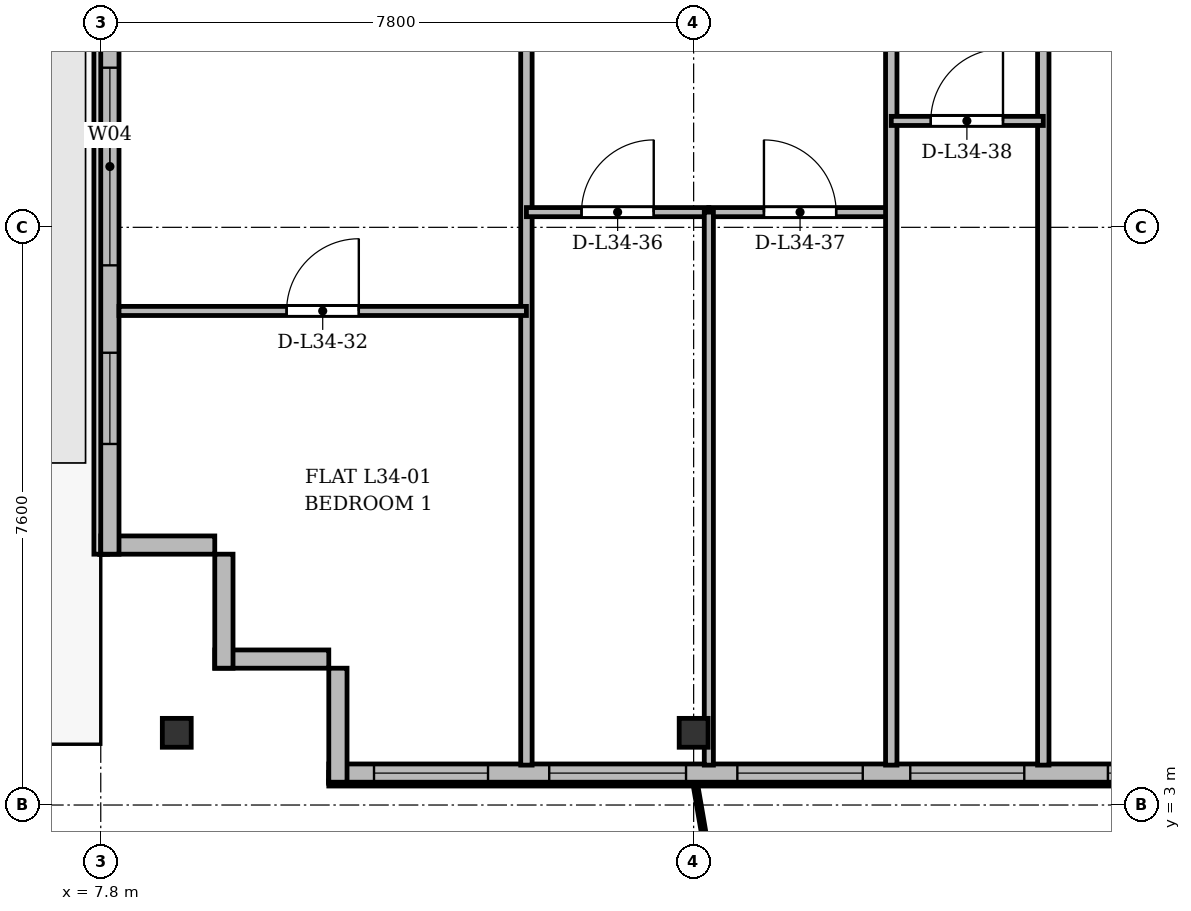
"""IFC4 building model, lengths in metres.
Left out: names, types, materials, properties, quantities, classifications, styles, units other than length and angle.
Written with IfcOpenShell. Run it as: python <this file> out.ifc"""

import sys

from ifc_helpers import new_model, si_unit, direction, frame, frame_2d, origin, origin_2d, place, context, subcontext, project, spatial, rectangle, i_section, extrude, source, transform, mapped, element, fill, save


model = new_model("IFC4")
c1 = context("Model", 3, precision=1e-05, world=origin(), true_north=direction((0.0, 1.0)))
c2 = subcontext(c1, "Body", "Model", "MODEL_VIEW")
j1 = project(units=[si_unit("LENGTHUNIT", "METRE"), si_unit("PLANEANGLEUNIT", "RADIAN")], contexts=[c1])
p1 = place(None, origin())
s1 = spatial("IfcSite", under=j1, at=p1, CompositionType="ELEMENT")
p2 = place(p1, origin())
s2 = spatial("IfcBuilding", under=s1, at=p2, CompositionType="ELEMENT")
p3 = place(p2, frame((0.0, 0.0, 132.1)))
s3 = spatial("IfcBuildingStorey", under=s2, at=p3, CompositionType="ELEMENT", Elevation=132.1)
m1 = source(origin(), c2, "Body", "SweptSolid", [
    extrude(i_section(OverallWidth=0.38, OverallDepth=0.38, WebThickness=0.02, FlangeThickness=0.03, at=origin_2d()), origin(), (0.0, 0.0, 1.0), 3.6),
])
for number, where, z_axis, x_axis in (
    (1, (8.8, 3.95, 0.0), (0.0, 0.0, 1.0), (1.0, 0.0, 0.0)),
    (2, (15.6, 3.95, 0.0), (0.0, 0.0, 1.0), (1.0, 0.0, 0.0)),
):
    element("IfcColumn", number, at=place(p3, frame(where, z_axis=z_axis, x_axis=x_axis)), inside=s3, PredefinedType="COLUMN", context=c2, shape_type="MappedRepresentation", body=[
        mapped(m1, transform((0.0, 0.0, 0.0), x_axis=(1.0, 0.0, 0.0), y_axis=(0.0, 1.0, 0.0), z_axis=(0.0, 0.0, 1.0), scale=1.0)),
    ])
for number, where, z_axis, x_axis in (
    (3, (10.8, 4.92, 0.0), (0.0, 0.0, 1.0), (-1.0, 0.0, 0.0)),
    (4, (9.42, 4.8, 0.0), (0.0, 0.0, 1.0), (0.0, 1.0, 0.0)),
):
    element("IfcWall", number, at=place(p3, frame(where, z_axis=z_axis, x_axis=x_axis)), inside=s3, PredefinedType="SOLIDWALL", context=c2, shape_type="SweptSolid", body=[
        extrude(rectangle(XDim=1.5, YDim=0.24, at=frame_2d((0.75, 0.0))), origin(), (0.0, 0.0, 1.0), 3.35),
    ])
p4 = place(p3, frame((9.3, 6.42, 0.0), z_axis=(0.0, 0.0, 1.0), x_axis=(-1.0, 0.0, 0.0)))
e5 = element("IfcWall", 5, at=p4, inside=s3, PredefinedType="SOLIDWALL", context=c2, shape_type="SweptSolid", body=[
    extrude(rectangle(XDim=1.5, YDim=0.24, at=frame_2d((0.75, 0.0))), origin(), (0.0, 0.0, 1.0), 2.85),
])
p5 = place(p3, frame((7.92, 6.3, 0.0), z_axis=(0.0, 0.0, 1.0), x_axis=(0.0, 1.0, 0.0)))
e6 = element("IfcWall", 6, at=p5, inside=s3, PredefinedType="SOLIDWALL", context=c2, shape_type="SweptSolid", body=[
    extrude(rectangle(XDim=39.2, YDim=0.24, at=frame_2d((19.6, 0.0))), origin(), (0.0, 0.0, 1.0), 3.35),
])
p6 = place(p5, frame((9.6, 0.0, 0.0)))
e7 = element("IfcOpeningElement", 7, at=p6, cuts=e6, PredefinedType="OPENING", context=c2, shape_type="SweptSolid", body=[
    extrude(rectangle(XDim=1.2, YDim=2.2, at=frame_2d((0.6, 1.1))), frame((0.0, 0.13, 0.0), z_axis=(0.0, -1.0, 0.0), x_axis=(1.0, 0.0, 0.0)), (0.0, 0.0, 1.0), 0.26),
])
p7 = place(p5, frame((1.45, 0.0, 0.92)))
e8 = element("IfcOpeningElement", 8, at=p7, cuts=e6, PredefinedType="OPENING", context=c2, shape_type="SweptSolid", body=[
    extrude(rectangle(XDim=1.2, YDim=1.65, at=frame_2d((0.6, 0.825))), frame((0.0, 0.13, 0.0), z_axis=(0.0, -1.0, 0.0), x_axis=(1.0, 0.0, 0.0)), (0.0, 0.0, 1.0), 0.26),
])
p8 = place(p5, frame((3.8, 0.0, 0.92)))
e9 = element("IfcOpeningElement", 9, at=p8, cuts=e6, PredefinedType="OPENING", context=c2, shape_type="SweptSolid", body=[
    extrude(rectangle(XDim=2.6, YDim=1.9, at=frame_2d((1.3, 0.95))), frame((0.0, 0.13, 0.0), z_axis=(0.0, -1.0, 0.0), x_axis=(1.0, 0.0, 0.0)), (0.0, 0.0, 1.0), 0.26),
])
p9 = place(p5, frame((15.2, 0.0, 0.92)))
e10 = element("IfcOpeningElement", 10, at=p9, cuts=e6, PredefinedType="OPENING", context=c2, shape_type="SweptSolid", body=[
    extrude(rectangle(XDim=2.6, YDim=1.9, at=frame_2d((1.3, 0.95))), frame((0.0, 0.13, 0.0), z_axis=(0.0, -1.0, 0.0), x_axis=(1.0, 0.0, 0.0)), (0.0, 0.0, 1.0), 0.26),
])
p10 = place(p5, frame((33.5, 0.0, 0.92)))
e11 = element("IfcOpeningElement", 11, at=p10, cuts=e6, PredefinedType="OPENING", context=c2, shape_type="SweptSolid", body=[
    extrude(rectangle(XDim=1.2, YDim=1.65, at=frame_2d((0.6, 0.825))), frame((0.0, 0.13, 0.0), z_axis=(0.0, -1.0, 0.0), x_axis=(1.0, 0.0, 0.0)), (0.0, 0.0, 1.0), 0.26),
])
p11 = place(p5, frame((36.85, 0.0, 0.92)))
e12 = element("IfcOpeningElement", 12, at=p11, cuts=e6, PredefinedType="OPENING", context=c2, shape_type="SweptSolid", body=[
    extrude(rectangle(XDim=1.2, YDim=1.65, at=frame_2d((0.6, 0.825))), frame((0.0, 0.13, 0.0), z_axis=(0.0, -1.0, 0.0), x_axis=(1.0, 0.0, 0.0)), (0.0, 0.0, 1.0), 0.26),
])
p12 = place(p3, frame((63.6, 3.42, 0.0), z_axis=(0.0, 0.0, 1.0), x_axis=(-1.0, 0.0, 0.0)))
e13 = element("IfcWall", 13, at=p12, inside=s3, PredefinedType="SOLIDWALL", context=c2, shape_type="SweptSolid", body=[
    extrude(rectangle(XDim=52.8, YDim=0.24, at=frame_2d((26.4, 0.0))), origin(), (0.0, 0.0, 1.0), 3.35),
])
p13 = place(p12, frame((0.42, 0.0, 0.9)))
e14 = element("IfcOpeningElement", 14, at=p13, cuts=e13, PredefinedType="OPENING", context=c2, shape_type="SweptSolid", body=[
    extrude(rectangle(XDim=1.65, YDim=1.85, at=frame_2d((0.825, 0.925))), frame((0.0, 0.13, 0.0), z_axis=(0.0, -1.0, 0.0), x_axis=(1.0, 0.0, 0.0)), (0.0, 0.0, 1.0), 0.26),
])
p14 = place(p12, frame((2.75, 0.0, 0.9)))
e15 = element("IfcOpeningElement", 15, at=p14, cuts=e13, PredefinedType="OPENING", context=c2, shape_type="SweptSolid", body=[
    extrude(rectangle(XDim=1.8, YDim=1.8, at=frame_2d((0.9, 0.9))), frame((0.0, 0.13, 0.0), z_axis=(0.0, -1.0, 0.0), x_axis=(1.0, 0.0, 0.0)), (0.0, 0.0, 1.0), 0.26),
])
p15 = place(p12, frame((5.902, 0.0, 0.0)))
e16 = element("IfcOpeningElement", 16, at=p15, cuts=e13, PredefinedType="OPENING", context=c2, shape_type="SweptSolid", body=[
    extrude(rectangle(XDim=1.2, YDim=2.2, at=frame_2d((0.6, 1.1))), frame((0.0, 0.13, 0.0), z_axis=(0.0, -1.0, 0.0), x_axis=(1.0, 0.0, 0.0)), (0.0, 0.0, 1.0), 0.26),
])
p16 = place(p12, frame((7.65, 0.0, 0.9)))
e17 = element("IfcOpeningElement", 17, at=p16, cuts=e13, PredefinedType="OPENING", context=c2, shape_type="SweptSolid", body=[
    extrude(rectangle(XDim=1.5, YDim=1.75, at=frame_2d((0.75, 0.875))), frame((0.0, 0.13, 0.0), z_axis=(0.0, -1.0, 0.0), x_axis=(1.0, 0.0, 0.0)), (0.0, 0.0, 1.0), 0.26),
])
p17 = place(p12, frame((10.0, 0.0, 0.9)))
e18 = element("IfcOpeningElement", 18, at=p17, cuts=e13, PredefinedType="OPENING", context=c2, shape_type="SweptSolid", body=[
    extrude(rectangle(XDim=2.0, YDim=1.95, at=frame_2d((1.0, 0.975))), frame((0.0, 0.13, 0.0), z_axis=(0.0, -1.0, 0.0), x_axis=(1.0, 0.0, 0.0)), (0.0, 0.0, 1.0), 0.26),
])
p18 = place(p12, frame((12.975, 0.0, 0.9)))
e19 = element("IfcOpeningElement", 19, at=p18, cuts=e13, PredefinedType="OPENING", context=c2, shape_type="SweptSolid", body=[
    extrude(rectangle(XDim=1.65, YDim=1.85, at=frame_2d((0.825, 0.925))), frame((0.0, 0.13, 0.0), z_axis=(0.0, -1.0, 0.0), x_axis=(1.0, 0.0, 0.0)), (0.0, 0.0, 1.0), 0.26),
])
p19 = place(p12, frame((15.3, 0.0, 0.9)))
e20 = element("IfcOpeningElement", 20, at=p19, cuts=e13, PredefinedType="OPENING", context=c2, shape_type="SweptSolid", body=[
    extrude(rectangle(XDim=1.8, YDim=1.8, at=frame_2d((0.9, 0.9))), frame((0.0, 0.13, 0.0), z_axis=(0.0, -1.0, 0.0), x_axis=(1.0, 0.0, 0.0)), (0.0, 0.0, 1.0), 0.26),
])
p20 = place(p12, frame((17.85, 0.0, 0.9)))
e21 = element("IfcOpeningElement", 21, at=p20, cuts=e13, PredefinedType="OPENING", context=c2, shape_type="SweptSolid", body=[
    extrude(rectangle(XDim=1.5, YDim=1.75, at=frame_2d((0.75, 0.875))), frame((0.0, 0.13, 0.0), z_axis=(0.0, -1.0, 0.0), x_axis=(1.0, 0.0, 0.0)), (0.0, 0.0, 1.0), 0.26),
])
p21 = place(p12, frame((20.7, 0.0, 0.9)))
e22 = element("IfcOpeningElement", 22, at=p21, cuts=e13, PredefinedType="OPENING", context=c2, shape_type="SweptSolid", body=[
    extrude(rectangle(XDim=1.5, YDim=1.75, at=frame_2d((0.75, 0.875))), frame((0.0, 0.13, 0.0), z_axis=(0.0, -1.0, 0.0), x_axis=(1.0, 0.0, 0.0)), (0.0, 0.0, 1.0), 0.26),
])
p22 = place(p12, frame((23.75, 0.0, 0.9)))
e23 = element("IfcOpeningElement", 23, at=p22, cuts=e13, PredefinedType="OPENING", context=c2, shape_type="SweptSolid", body=[
    extrude(rectangle(XDim=2.0, YDim=1.95, at=frame_2d((1.0, 0.975))), frame((0.0, 0.13, 0.0), z_axis=(0.0, -1.0, 0.0), x_axis=(1.0, 0.0, 0.0)), (0.0, 0.0, 1.0), 0.26),
])
p23 = place(p12, frame((28.875, 0.0, 0.9)))
e24 = element("IfcOpeningElement", 24, at=p23, cuts=e13, PredefinedType="OPENING", context=c2, shape_type="SweptSolid", body=[
    extrude(rectangle(XDim=1.65, YDim=1.85, at=frame_2d((0.825, 0.925))), frame((0.0, 0.13, 0.0), z_axis=(0.0, -1.0, 0.0), x_axis=(1.0, 0.0, 0.0)), (0.0, 0.0, 1.0), 0.26),
])
p24 = place(p12, frame((34.478, 0.0, 0.0)))
e25 = element("IfcOpeningElement", 25, at=p24, cuts=e13, PredefinedType="OPENING", context=c2, shape_type="SweptSolid", body=[
    extrude(rectangle(XDim=1.2, YDim=2.2, at=frame_2d((0.6, 1.1))), frame((0.0, 0.13, 0.0), z_axis=(0.0, -1.0, 0.0), x_axis=(1.0, 0.0, 0.0)), (0.0, 0.0, 1.0), 0.26),
])
p25 = place(p12, frame((37.3, 0.0, 0.9)))
e26 = element("IfcOpeningElement", 26, at=p25, cuts=e13, PredefinedType="OPENING", context=c2, shape_type="SweptSolid", body=[
    extrude(rectangle(XDim=2.2, YDim=1.8, at=frame_2d((1.1, 0.9))), frame((0.0, 0.13, 0.0), z_axis=(0.0, -1.0, 0.0), x_axis=(1.0, 0.0, 0.0)), (0.0, 0.0, 1.0), 0.26),
])
p26 = place(p12, frame((41.05, 0.0, 0.9)))
e27 = element("IfcOpeningElement", 27, at=p26, cuts=e13, PredefinedType="OPENING", context=c2, shape_type="SweptSolid", body=[
    extrude(rectangle(XDim=1.5, YDim=1.75, at=frame_2d((0.75, 0.875))), frame((0.0, 0.13, 0.0), z_axis=(0.0, -1.0, 0.0), x_axis=(1.0, 0.0, 0.0)), (0.0, 0.0, 1.0), 0.26),
])
p27 = place(p12, frame((43.65, 0.0, 0.9)))
e28 = element("IfcOpeningElement", 28, at=p27, cuts=e13, PredefinedType="OPENING", context=c2, shape_type="SweptSolid", body=[
    extrude(rectangle(XDim=1.5, YDim=1.75, at=frame_2d((0.75, 0.875))), frame((0.0, 0.13, 0.0), z_axis=(0.0, -1.0, 0.0), x_axis=(1.0, 0.0, 0.0)), (0.0, 0.0, 1.0), 0.26),
])
p28 = place(p12, frame((45.775, 0.0, 0.9)))
e29 = element("IfcOpeningElement", 29, at=p28, cuts=e13, PredefinedType="OPENING", context=c2, shape_type="SweptSolid", body=[
    extrude(rectangle(XDim=1.65, YDim=1.85, at=frame_2d((0.825, 0.925))), frame((0.0, 0.13, 0.0), z_axis=(0.0, -1.0, 0.0), x_axis=(1.0, 0.0, 0.0)), (0.0, 0.0, 1.0), 0.26),
])
p29 = place(p12, frame((48.1, 0.0, 0.9)))
e30 = element("IfcOpeningElement", 30, at=p29, cuts=e13, PredefinedType="OPENING", context=c2, shape_type="SweptSolid", body=[
    extrude(rectangle(XDim=1.8, YDim=1.8, at=frame_2d((0.9, 0.9))), frame((0.0, 0.13, 0.0), z_axis=(0.0, -1.0, 0.0), x_axis=(1.0, 0.0, 0.0)), (0.0, 0.0, 1.0), 0.26),
])
p30 = place(p12, frame((50.705, 0.0, 0.9)))
e31 = element("IfcOpeningElement", 31, at=p30, cuts=e13, PredefinedType="OPENING", context=c2, shape_type="SweptSolid", body=[
    extrude(rectangle(XDim=1.5, YDim=1.75, at=frame_2d((0.75, 0.875))), frame((0.0, 0.13, 0.0), z_axis=(0.0, -1.0, 0.0), x_axis=(1.0, 0.0, 0.0)), (0.0, 0.0, 1.0), 0.26),
])
p31 = place(p3, frame((10.92, 3.3, 0.0), z_axis=(0.0, 0.0, 1.0), x_axis=(0.0, 1.0, 0.0)))
e32 = element("IfcWall", 32, at=p31, inside=s3, PredefinedType="SOLIDWALL", context=c2, shape_type="SweptSolid", body=[
    extrude(rectangle(XDim=1.5, YDim=0.24, at=frame_2d((0.75, 0.0))), origin(), (0.0, 0.0, 1.0), 2.75),
])
p32 = place(p3, frame((13.4, 3.525, 0.0), z_axis=(0.0, 0.0, 1.0), x_axis=(0.0, 1.0, 0.0)))
e33 = element("IfcWall", 33, at=p32, inside=s3, PredefinedType="PARTITIONING", context=c2, shape_type="SweptSolid", body=[
    extrude(rectangle(XDim=27.275, YDim=0.15, at=frame_2d((13.638, 0.0))), origin(), (0.0, 0.0, 1.0), 2.75),
])
p33 = place(p3, frame((8.04, 9.5, 0.0), z_axis=(0.0, 0.0, 1.0), x_axis=(1.0, 0.0, 0.0)))
e34 = element("IfcWall", 34, at=p33, inside=s3, PredefinedType="PARTITIONING", context=c2, shape_type="SweptSolid", body=[
    extrude(rectangle(XDim=5.36, YDim=0.12, at=frame_2d((2.68, 0.0))), origin(), (0.0, 0.0, 1.0), 2.85),
])
p34 = place(p33, frame((2.205, 0.0, 0.0)))
e35 = element("IfcOpeningElement", 35, at=p34, cuts=e34, PredefinedType="OPENING", context=c2, shape_type="SweptSolid", body=[
    extrude(rectangle(XDim=0.95, YDim=2.15, at=frame_2d((0.475, 1.075))), frame((0.0, 0.07, 0.0), z_axis=(0.0, -1.0, 0.0), x_axis=(1.0, 0.0, 0.0)), (0.0, 0.0, 1.0), 0.14),
])
p35 = place(p3, frame((13.4, 10.8, 0.0), z_axis=(0.0, 0.0, 1.0), x_axis=(1.0, 0.0, 0.0)))
e36 = element("IfcWall", 36, at=p35, inside=s3, PredefinedType="PARTITIONING", context=c2, shape_type="SweptSolid", body=[
    extrude(rectangle(XDim=2.4, YDim=0.12, at=frame_2d((1.2, 0.0))), origin(), (0.0, 0.0, 1.0), 2.85),
])
p36 = place(p35, frame((0.725, 0.0, 0.0)))
e37 = element("IfcOpeningElement", 37, at=p36, cuts=e36, PredefinedType="OPENING", context=c2, shape_type="SweptSolid", body=[
    extrude(rectangle(XDim=0.95, YDim=2.15, at=frame_2d((0.475, 1.075))), frame((0.0, 0.07, 0.0), z_axis=(0.0, -1.0, 0.0), x_axis=(1.0, 0.0, 0.0)), (0.0, 0.0, 1.0), 0.14),
])
p37 = place(p3, frame((15.8, 10.8, 0.0), z_axis=(0.0, 0.0, 1.0), x_axis=(1.0, 0.0, 0.0)))
e38 = element("IfcWall", 38, at=p37, inside=s3, PredefinedType="PARTITIONING", context=c2, shape_type="SweptSolid", body=[
    extrude(rectangle(XDim=2.4, YDim=0.12, at=frame_2d((1.2, 0.0))), origin(), (0.0, 0.0, 1.0), 3.0),
])
p38 = place(p37, frame((0.725, 0.0, 0.0)))
e39 = element("IfcOpeningElement", 39, at=p38, cuts=e38, PredefinedType="OPENING", context=c2, shape_type="SweptSolid", body=[
    extrude(rectangle(XDim=0.95, YDim=2.15, at=frame_2d((0.475, 1.075))), frame((0.0, 0.07, 0.0), z_axis=(0.0, -1.0, 0.0), x_axis=(1.0, 0.0, 0.0)), (0.0, 0.0, 1.0), 0.14),
])
p39 = place(p3, frame((15.8, 3.525, 0.0), z_axis=(0.0, 0.0, 1.0), x_axis=(0.0, 1.0, 0.0)))
e40 = element("IfcWall", 40, at=p39, inside=s3, PredefinedType="PARTITIONING", context=c2, shape_type="SweptSolid", body=[
    extrude(rectangle(XDim=7.275, YDim=0.12, at=frame_2d((3.638, 0.0))), origin(), (0.0, 0.0, 1.0), 2.75),
])
for number, where, z_axis, x_axis in (
    (41, (18.2, 3.525, 0.0), (0.0, 0.0, 1.0), (0.0, 1.0, 0.0)),
    (42, (20.2, 3.525, 0.0), (0.0, 0.0, 1.0), (0.0, 1.0, 0.0)),
):
    element("IfcWall", number, at=place(p3, frame(where, z_axis=z_axis, x_axis=x_axis)), inside=s3, PredefinedType="PARTITIONING", context=c2, shape_type="SweptSolid", body=[
        extrude(rectangle(XDim=27.275, YDim=0.15, at=frame_2d((13.638, 0.0))), origin(), (0.0, 0.0, 1.0), 2.75),
    ])
p40 = place(p3, frame((18.2, 12.0, 0.0), z_axis=(0.0, 0.0, 1.0), x_axis=(1.0, 0.0, 0.0)))
e43 = element("IfcWall", 43, at=p40, inside=s3, PredefinedType="PARTITIONING", context=c2, shape_type="SweptSolid", body=[
    extrude(rectangle(XDim=2.0, YDim=0.12, at=frame_2d((1.0, 0.0))), origin(), (0.0, 0.0, 1.0), 3.35),
])
p41 = place(p40, frame((0.52, 0.0, 0.0)))
e44 = element("IfcOpeningElement", 44, at=p41, cuts=e43, PredefinedType="OPENING", context=c2, shape_type="SweptSolid", body=[
    extrude(rectangle(XDim=0.95, YDim=2.15, at=frame_2d((0.475, 1.075))), frame((0.0, 0.07, 0.0), z_axis=(0.0, -1.0, 0.0), x_axis=(1.0, 0.0, 0.0)), (0.0, 0.0, 1.0), 0.14),
])
m2 = source(origin(), c2, "Body", "SweptSolid", [
    extrude(rectangle(XDim=1.2, YDim=1.65, at=frame_2d((0.6, 0.825))), frame((0.0, 0.03, 0.0), z_axis=(0.0, -1.0, 0.0), x_axis=(1.0, 0.0, 0.0)), (0.0, 0.0, 1.0), 0.06),
])
p42 = place(p7, origin())
e45 = element("IfcWindow", 45, at=p42, inside=s3, PartitioningType="SINGLE_PANEL", PredefinedType="WINDOW", context=c2, shape_type="MappedRepresentation", body=[
    mapped(m2, transform((0.0, 0.0, 0.0), x_axis=(1.0, 0.0, 0.0), y_axis=(0.0, 1.0, 0.0), z_axis=(0.0, 0.0, 1.0), scale=1.0)),
])
fill(e8, e45)
m3 = source(origin(), c2, "Body", "SweptSolid", [
    extrude(rectangle(XDim=2.6, YDim=1.9, at=frame_2d((1.3, 0.95))), frame((0.0, 0.03, 0.0), z_axis=(0.0, -1.0, 0.0), x_axis=(1.0, 0.0, 0.0)), (0.0, 0.0, 1.0), 0.06),
])
p43 = place(p8, origin())
e46 = element("IfcWindow", 46, at=p43, inside=s3, PartitioningType="SINGLE_PANEL", PredefinedType="WINDOW", context=c2, shape_type="MappedRepresentation", body=[
    mapped(m3, transform((0.0, 0.0, 0.0), x_axis=(1.0, 0.0, 0.0), y_axis=(0.0, 1.0, 0.0), z_axis=(0.0, 0.0, 1.0), scale=1.0)),
])
fill(e9, e46)
m4 = source(origin(), c2, "Body", "SweptSolid", [
    extrude(rectangle(XDim=1.5, YDim=1.75, at=frame_2d((0.75, 0.875))), frame((0.0, 0.03, 0.0), z_axis=(0.0, -1.0, 0.0), x_axis=(1.0, 0.0, 0.0)), (0.0, 0.0, 1.0), 0.06),
])
p44 = place(p26, origin())
e47 = element("IfcWindow", 47, at=p44, inside=s3, PartitioningType="SINGLE_PANEL", PredefinedType="WINDOW", context=c2, shape_type="MappedRepresentation", body=[
    mapped(m4, transform((0.0, 0.0, 0.0), x_axis=(1.0, 0.0, 0.0), y_axis=(0.0, 1.0, 0.0), z_axis=(0.0, 0.0, 1.0), scale=1.0)),
])
fill(e27, e47)
p45 = place(p27, origin())
e48 = element("IfcWindow", 48, at=p45, inside=s3, PartitioningType="SINGLE_PANEL", PredefinedType="WINDOW", context=c2, shape_type="MappedRepresentation", body=[
    mapped(m4, transform((0.0, 0.0, 0.0), x_axis=(1.0, 0.0, 0.0), y_axis=(0.0, 1.0, 0.0), z_axis=(0.0, 0.0, 1.0), scale=1.0)),
])
fill(e28, e48)
m5 = source(origin(), c2, "Body", "SweptSolid", [
    extrude(rectangle(XDim=1.65, YDim=1.85, at=frame_2d((0.825, 0.925))), frame((0.0, 0.03, 0.0), z_axis=(0.0, -1.0, 0.0), x_axis=(1.0, 0.0, 0.0)), (0.0, 0.0, 1.0), 0.06),
])
p46 = place(p28, origin())
e49 = element("IfcWindow", 49, at=p46, inside=s3, PartitioningType="SINGLE_PANEL", PredefinedType="WINDOW", context=c2, shape_type="MappedRepresentation", body=[
    mapped(m5, transform((0.0, 0.0, 0.0), x_axis=(1.0, 0.0, 0.0), y_axis=(0.0, 1.0, 0.0), z_axis=(0.0, 0.0, 1.0), scale=1.0)),
])
fill(e29, e49)
m6 = source(origin(), c2, "Body", "SweptSolid", [
    extrude(rectangle(XDim=1.8, YDim=1.8, at=frame_2d((0.9, 0.9))), frame((0.0, 0.03, 0.0), z_axis=(0.0, -1.0, 0.0), x_axis=(1.0, 0.0, 0.0)), (0.0, 0.0, 1.0), 0.06),
])
p47 = place(p29, origin())
e50 = element("IfcWindow", 50, at=p47, inside=s3, PartitioningType="SINGLE_PANEL", PredefinedType="WINDOW", context=c2, shape_type="MappedRepresentation", body=[
    mapped(m6, transform((0.0, 0.0, 0.0), x_axis=(1.0, 0.0, 0.0), y_axis=(0.0, 1.0, 0.0), z_axis=(0.0, 0.0, 1.0), scale=1.0)),
])
fill(e30, e50)
p48 = place(p30, origin())
e51 = element("IfcWindow", 51, at=p48, inside=s3, PartitioningType="SINGLE_PANEL", PredefinedType="WINDOW", context=c2, shape_type="MappedRepresentation", body=[
    mapped(m4, transform((0.0, 0.0, 0.0), x_axis=(1.0, 0.0, 0.0), y_axis=(0.0, 1.0, 0.0), z_axis=(0.0, 0.0, 1.0), scale=1.0)),
])
fill(e31, e51)
m7 = source(origin(), c2, "Body", "SweptSolid", [
    extrude(rectangle(XDim=0.95, YDim=2.15, at=frame_2d((0.475, 1.075))), frame((0.0, 0.025, 0.0), z_axis=(0.0, -1.0, 0.0), x_axis=(1.0, 0.0, 0.0)), (0.0, 0.0, 1.0), 0.05),
])
p49 = place(p34, origin())
e52 = element("IfcDoor", 52, at=p49, inside=s3, OperationType="SINGLE_SWING_RIGHT", PredefinedType="DOOR", context=c2, shape_type="MappedRepresentation", body=[
    mapped(m7, transform((0.0, 0.0, 0.0), x_axis=(1.0, 0.0, 0.0), y_axis=(0.0, 1.0, 0.0), z_axis=(0.0, 0.0, 1.0), scale=1.0)),
])
fill(e35, e52)
p50 = place(p36, origin())
e53 = element("IfcDoor", 53, at=p50, inside=s3, OperationType="SINGLE_SWING_RIGHT", PredefinedType="DOOR", context=c2, shape_type="MappedRepresentation", body=[
    mapped(m7, transform((0.0, 0.0, 0.0), x_axis=(1.0, 0.0, 0.0), y_axis=(0.0, 1.0, 0.0), z_axis=(0.0, 0.0, 1.0), scale=1.0)),
])
fill(e37, e53)
p51 = place(p38, origin())
e54 = element("IfcDoor", 54, at=p51, inside=s3, OperationType="SINGLE_SWING_LEFT", PredefinedType="DOOR", context=c2, shape_type="MappedRepresentation", body=[
    mapped(m7, transform((0.0, 0.0, 0.0), x_axis=(1.0, 0.0, 0.0), y_axis=(0.0, 1.0, 0.0), z_axis=(0.0, 0.0, 1.0), scale=1.0)),
])
fill(e39, e54)
p52 = place(p41, origin())
e55 = element("IfcDoor", 55, at=p52, inside=s3, OperationType="SINGLE_SWING_RIGHT", PredefinedType="DOOR", context=c2, shape_type="MappedRepresentation", body=[
    mapped(m7, transform((0.0, 0.0, 0.0), x_axis=(1.0, 0.0, 0.0), y_axis=(0.0, 1.0, 0.0), z_axis=(0.0, 0.0, 1.0), scale=1.0)),
])
fill(e44, e55)
save(model, sys.argv[1])
